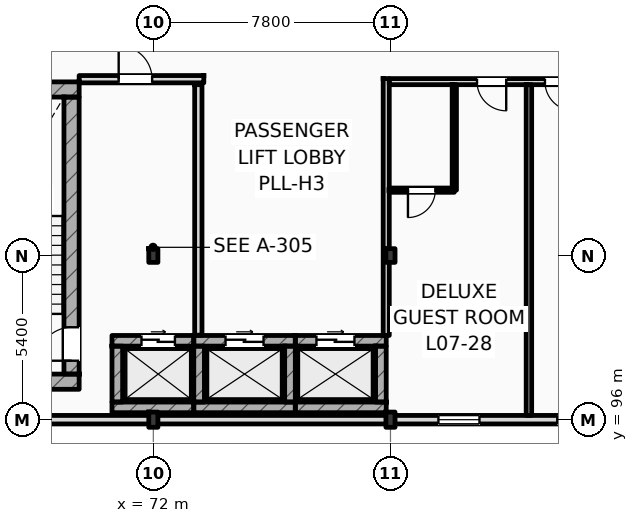
"""IFC4 building model, lengths in metres.
Left out: names, types, materials, properties, quantities, classifications, styles, units other than length and angle.
Written with IfcOpenShell. Run it as: python <this file> out.ifc"""

import sys

from ifc_helpers import new_model, si_unit, direction, frame, frame_2d, origin, origin_2d, place, context, subcontext, project, spatial, rectangle, i_section, extrude, element, fill, save


model = new_model("IFC4")
c1 = context("Model", 3, precision=1e-05, world=origin(), true_north=direction((0.0, 1.0)))
c2 = subcontext(c1, "Body", "Model", "MODEL_VIEW")
j1 = project(units=[si_unit("LENGTHUNIT", "METRE"), si_unit("PLANEANGLEUNIT", "RADIAN")], contexts=[c1])
p1 = place(None, origin())
s1 = spatial("IfcSite", under=j1, at=p1, CompositionType="ELEMENT")
p2 = place(p1, origin())
s2 = spatial("IfcBuilding", under=s1, at=p2, CompositionType="ELEMENT")
p3 = place(p2, frame((0.0, 0.0, 31.8)))
s3 = spatial("IfcBuildingStorey", under=s2, at=p3, CompositionType="ELEMENT", Elevation=31.8)
p4 = place(p3, frame((72.0, 96.0, 0.0), z_axis=(0.0, 0.0, 1.0), x_axis=(1.0, 0.0, 0.0)))
e1 = element("IfcColumn", 1, at=p4, inside=s3, PredefinedType="COLUMN", context=c2, shape_type="SweptSolid", body=[
    extrude(i_section(OverallWidth=0.3, OverallDepth=0.5, WebThickness=0.014, FlangeThickness=0.028, FilletRadius=0.027, at=origin_2d()), origin(), (0.0, 0.0, 1.0), 3.6),
])
p5 = place(p3, frame((72.0, 101.4, 0.0), z_axis=(0.0, 0.0, 1.0), x_axis=(1.0, 0.0, 0.0)))
e2 = element("IfcColumn", 2, at=p5, inside=s3, PredefinedType="COLUMN", context=c2, shape_type="SweptSolid", body=[
    extrude(i_section(OverallWidth=0.3, OverallDepth=0.45, WebThickness=0.014, FlangeThickness=0.026, FilletRadius=0.027, at=origin_2d()), origin(), (0.0, 0.0, 1.0), 3.6),
])
p6 = place(p3, frame((79.8, 96.0, 0.0), z_axis=(0.0, 0.0, 1.0), x_axis=(1.0, 0.0, 0.0)))
e3 = element("IfcColumn", 3, at=p6, inside=s3, PredefinedType="COLUMN", context=c2, shape_type="SweptSolid", body=[
    extrude(i_section(OverallWidth=0.3, OverallDepth=0.5, WebThickness=0.014, FlangeThickness=0.028, FilletRadius=0.027, at=origin_2d()), origin(), (0.0, 0.0, 1.0), 3.6),
])
p7 = place(p3, frame((79.8, 101.4, 0.0), z_axis=(0.0, 0.0, 1.0), x_axis=(1.0, 0.0, 0.0)))
e4 = element("IfcColumn", 4, at=p7, inside=s3, PredefinedType="COLUMN", context=c2, shape_type="SweptSolid", body=[
    extrude(i_section(OverallWidth=0.3, OverallDepth=0.45, WebThickness=0.014, FlangeThickness=0.026, FilletRadius=0.027, at=origin_2d()), origin(), (0.0, 0.0, 1.0), 3.6),
])
for number, where, z_axis, x_axis in (
    (5, (64.4, 106.862, 0.0), (0.0, 0.0, 1.0), (1.0, 0.0, 0.0)),
    (6, (64.4, 97.25, 0.0), (0.0, 0.0, 1.0), (1.0, 0.0, 0.0)),
):
    element("IfcWall", number, at=place(p3, frame(where, z_axis=z_axis, x_axis=x_axis)), inside=s3, PredefinedType="SHEAR", context=c2, shape_type="SweptSolid", body=[
        extrude(rectangle(XDim=5.16, YDim=0.5, at=frame_2d((2.58, 0.0))), origin(), (0.0, 0.0, 1.0), 3.6),
    ])
p8 = place(p3, frame((69.31, 97.5, 0.0), z_axis=(0.0, 0.0, 1.0), x_axis=(0.0, 1.0, 0.0)))
e7 = element("IfcWall", 7, at=p8, inside=s3, PredefinedType="SHEAR", context=c2, shape_type="SweptSolid", body=[
    extrude(rectangle(XDim=9.112, YDim=0.5, at=frame_2d((4.556, 0.0))), origin(), (0.0, 0.0, 1.0), 3.6),
])
p9 = place(p8, frame((0.44, 0.0, 0.0)))
e8 = element("IfcOpeningElement", 8, at=p9, cuts=e7, PredefinedType="OPENING", context=c2, shape_type="SweptSolid", body=[
    extrude(rectangle(XDim=1.1, YDim=2.2, at=frame_2d((0.55, 1.1))), frame((0.0, 0.26, 0.0), z_axis=(0.0, -1.0, 0.0), x_axis=(1.0, 0.0, 0.0)), (0.0, 0.0, 1.0), 0.52),
])
p10 = place(p3, frame((25.2, 96.0, 0.0), z_axis=(0.0, 0.0, 1.0), x_axis=(1.0, 0.0, 0.0)))
e9 = element("IfcWall", 9, at=p10, inside=s3, PredefinedType="STANDARD", context=c2, shape_type="SweptSolid", body=[
    extrude(rectangle(XDim=94.8, YDim=0.28, at=frame_2d((47.4, 0.0))), origin(), (0.0, 0.0, 1.0), 2.72),
])
p11 = place(p10, frame((16.394, 0.0, 0.9)))
e10 = element("IfcOpeningElement", 10, at=p11, cuts=e9, PredefinedType="OPENING", context=c2, shape_type="SweptSolid", body=[
    extrude(rectangle(XDim=2.0, YDim=1.64, at=frame_2d((1.0, 0.82))), frame((0.0, 0.15, 0.0), z_axis=(0.0, -1.0, 0.0), x_axis=(1.0, 0.0, 0.0)), (0.0, 0.0, 1.0), 0.3),
])
p12 = place(p10, frame((20.207, 0.0, 0.9)))
e11 = element("IfcOpeningElement", 11, at=p12, cuts=e9, PredefinedType="OPENING", context=c2, shape_type="SweptSolid", body=[
    extrude(rectangle(XDim=2.3, YDim=1.64, at=frame_2d((1.15, 0.82))), frame((0.0, 0.15, 0.0), z_axis=(0.0, -1.0, 0.0), x_axis=(1.0, 0.0, 0.0)), (0.0, 0.0, 1.0), 0.3),
])
p13 = place(p10, frame((24.287, 0.0, 0.9)))
e12 = element("IfcOpeningElement", 12, at=p13, cuts=e9, PredefinedType="OPENING", context=c2, shape_type="SweptSolid", body=[
    extrude(rectangle(XDim=2.358, YDim=1.64, at=frame_2d((1.179, 0.82))), frame((0.0, 0.15, 0.0), z_axis=(0.0, -1.0, 0.0), x_axis=(1.0, 0.0, 0.0)), (0.0, 0.0, 1.0), 0.3),
])
p14 = place(p10, frame((27.665, 0.0, 0.9)))
e13 = element("IfcOpeningElement", 13, at=p14, cuts=e9, PredefinedType="OPENING", context=c2, shape_type="SweptSolid", body=[
    extrude(rectangle(XDim=1.8, YDim=1.64, at=frame_2d((0.9, 0.82))), frame((0.0, 0.15, 0.0), z_axis=(0.0, -1.0, 0.0), x_axis=(1.0, 0.0, 0.0)), (0.0, 0.0, 1.0), 0.3),
])
p15 = place(p10, frame((32.103, 0.0, 0.9)))
e14 = element("IfcOpeningElement", 14, at=p15, cuts=e9, PredefinedType="OPENING", context=c2, shape_type="SweptSolid", body=[
    extrude(rectangle(XDim=2.359, YDim=1.64, at=frame_2d((1.179, 0.82))), frame((0.0, 0.15, 0.0), z_axis=(0.0, -1.0, 0.0), x_axis=(1.0, 0.0, 0.0)), (0.0, 0.0, 1.0), 0.3),
])
p16 = place(p10, frame((36.336, 0.0, 0.9)))
e15 = element("IfcOpeningElement", 15, at=p16, cuts=e9, PredefinedType="OPENING", context=c2, shape_type="SweptSolid", body=[
    extrude(rectangle(XDim=1.2, YDim=1.64, at=frame_2d((0.6, 0.82))), frame((0.0, 0.15, 0.0), z_axis=(0.0, -1.0, 0.0), x_axis=(1.0, 0.0, 0.0)), (0.0, 0.0, 1.0), 0.3),
])
p17 = place(p10, frame((56.177, 0.0, 0.9)))
e16 = element("IfcOpeningElement", 16, at=p17, cuts=e9, PredefinedType="OPENING", context=c2, shape_type="SweptSolid", body=[
    extrude(rectangle(XDim=1.35, YDim=1.64, at=frame_2d((0.675, 0.82))), frame((0.0, 0.15, 0.0), z_axis=(0.0, -1.0, 0.0), x_axis=(1.0, 0.0, 0.0)), (0.0, 0.0, 1.0), 0.3),
])
p18 = place(p10, frame((60.086, 0.0, 0.9)))
e17 = element("IfcOpeningElement", 17, at=p18, cuts=e9, PredefinedType="OPENING", context=c2, shape_type="SweptSolid", body=[
    extrude(rectangle(XDim=1.5, YDim=1.64, at=frame_2d((0.75, 0.82))), frame((0.0, 0.15, 0.0), z_axis=(0.0, -1.0, 0.0), x_axis=(1.0, 0.0, 0.0)), (0.0, 0.0, 1.0), 0.3),
])
p19 = place(p10, frame((64.838, 0.0, 0.9)))
e18 = element("IfcOpeningElement", 18, at=p19, cuts=e9, PredefinedType="OPENING", context=c2, shape_type="SweptSolid", body=[
    extrude(rectangle(XDim=1.65, YDim=1.64, at=frame_2d((0.825, 0.82))), frame((0.0, 0.15, 0.0), z_axis=(0.0, -1.0, 0.0), x_axis=(1.0, 0.0, 0.0)), (0.0, 0.0, 1.0), 0.3),
])
p20 = place(p10, frame((68.419, 0.0, 0.9)))
e19 = element("IfcOpeningElement", 19, at=p20, cuts=e9, PredefinedType="OPENING", context=c2, shape_type="SweptSolid", body=[
    extrude(rectangle(XDim=0.9, YDim=1.64, at=frame_2d((0.45, 0.82))), frame((0.0, 0.15, 0.0), z_axis=(0.0, -1.0, 0.0), x_axis=(1.0, 0.0, 0.0)), (0.0, 0.0, 1.0), 0.3),
])
p21 = place(p10, frame((73.544, 0.0, 0.9)))
e20 = element("IfcOpeningElement", 20, at=p21, cuts=e9, PredefinedType="OPENING", context=c2, shape_type="SweptSolid", body=[
    extrude(rectangle(XDim=1.95, YDim=1.64, at=frame_2d((0.975, 0.82))), frame((0.0, 0.15, 0.0), z_axis=(0.0, -1.0, 0.0), x_axis=(1.0, 0.0, 0.0)), (0.0, 0.0, 1.0), 0.3),
])
p22 = place(p10, frame((78.897, 0.0, 0.9)))
e21 = element("IfcOpeningElement", 21, at=p22, cuts=e9, PredefinedType="OPENING", context=c2, shape_type="SweptSolid", body=[
    extrude(rectangle(XDim=1.35, YDim=1.64, at=frame_2d((0.675, 0.82))), frame((0.0, 0.15, 0.0), z_axis=(0.0, -1.0, 0.0), x_axis=(1.0, 0.0, 0.0)), (0.0, 0.0, 1.0), 0.3),
])
p23 = place(p10, frame((82.249, 0.0, 0.9)))
e22 = element("IfcOpeningElement", 22, at=p23, cuts=e9, PredefinedType="OPENING", context=c2, shape_type="SweptSolid", body=[
    extrude(rectangle(XDim=2.25, YDim=1.64, at=frame_2d((1.125, 0.82))), frame((0.0, 0.15, 0.0), z_axis=(0.0, -1.0, 0.0), x_axis=(1.0, 0.0, 0.0)), (0.0, 0.0, 1.0), 0.3),
])
p24 = place(p10, frame((87.202, 0.0, 0.9)))
e23 = element("IfcOpeningElement", 23, at=p24, cuts=e9, PredefinedType="OPENING", context=c2, shape_type="SweptSolid", body=[
    extrude(rectangle(XDim=1.8, YDim=1.64, at=frame_2d((0.9, 0.82))), frame((0.0, 0.15, 0.0), z_axis=(0.0, -1.0, 0.0), x_axis=(1.0, 0.0, 0.0)), (0.0, 0.0, 1.0), 0.3),
])
p25 = place(p10, frame((90.867, 0.0, 0.9)))
e24 = element("IfcOpeningElement", 24, at=p25, cuts=e9, PredefinedType="OPENING", context=c2, shape_type="SweptSolid", body=[
    extrude(rectangle(XDim=2.55, YDim=1.64, at=frame_2d((1.275, 0.82))), frame((0.0, 0.15, 0.0), z_axis=(0.0, -1.0, 0.0), x_axis=(1.0, 0.0, 0.0)), (0.0, 0.0, 1.0), 0.3),
])
p26 = place(p3, frame((70.64, 98.595, 0.0), z_axis=(0.0, 0.0, 1.0), x_axis=(1.0, 0.0, 0.0)))
e25 = element("IfcWall", 25, at=p26, inside=s3, PredefinedType="SHEAR", context=c2, shape_type="SweptSolid", body=[
    extrude(rectangle(XDim=2.69, YDim=0.35, at=frame_2d((1.345, 0.0))), origin(), (0.0, 0.0, 1.0), 3.36),
])
p27 = place(p26, frame((0.97, 0.0, 0.0)))
e26 = element("IfcOpeningElement", 26, at=p27, cuts=e25, PredefinedType="OPENING", context=c2, shape_type="SweptSolid", body=[
    extrude(rectangle(XDim=1.1, YDim=2.2, at=frame_2d((0.55, 1.1))), frame((0.0, 0.185, 0.0), z_axis=(0.0, -1.0, 0.0), x_axis=(1.0, 0.0, 0.0)), (0.0, 0.0, 1.0), 0.37),
])
p28 = place(p3, frame((70.64, 96.405, 0.0), z_axis=(0.0, 0.0, 1.0), x_axis=(1.0, 0.0, 0.0)))
e27 = element("IfcWall", 27, at=p28, inside=s3, PredefinedType="SHEAR", context=c2, shape_type="SweptSolid", body=[
    extrude(rectangle(XDim=2.69, YDim=0.35, at=frame_2d((1.345, 0.0))), origin(), (0.0, 0.0, 1.0), 3.36),
])
p29 = place(p3, frame((70.815, 96.58, 0.0), z_axis=(0.0, 0.0, 1.0), x_axis=(0.0, 1.0, 0.0)))
e28 = element("IfcWall", 28, at=p29, inside=s3, PredefinedType="SHEAR", context=c2, shape_type="SweptSolid", body=[
    extrude(rectangle(XDim=1.84, YDim=0.35, at=frame_2d((0.92, 0.0))), origin(), (0.0, 0.0, 1.0), 3.36),
])
p30 = place(p3, frame((73.33, 98.595, 0.0), z_axis=(0.0, 0.0, 1.0), x_axis=(1.0, 0.0, 0.0)))
e29 = element("IfcWall", 29, at=p30, inside=s3, PredefinedType="SHEAR", context=c2, shape_type="SweptSolid", body=[
    extrude(rectangle(XDim=3.34, YDim=0.35, at=frame_2d((1.67, 0.0))), origin(), (0.0, 0.0, 1.0), 3.36),
])
p31 = place(p30, frame((1.045, 0.0, 0.0)))
e30 = element("IfcOpeningElement", 30, at=p31, cuts=e29, PredefinedType="OPENING", context=c2, shape_type="SweptSolid", body=[
    extrude(rectangle(XDim=1.25, YDim=2.25, at=frame_2d((0.625, 1.125))), frame((0.0, 0.185, 0.0), z_axis=(0.0, -1.0, 0.0), x_axis=(1.0, 0.0, 0.0)), (0.0, 0.0, 1.0), 0.37),
])
p32 = place(p3, frame((73.33, 96.405, 0.0), z_axis=(0.0, 0.0, 1.0), x_axis=(1.0, 0.0, 0.0)))
e31 = element("IfcWall", 31, at=p32, inside=s3, PredefinedType="SHEAR", context=c2, shape_type="SweptSolid", body=[
    extrude(rectangle(XDim=3.34, YDim=0.35, at=frame_2d((1.67, 0.0))), origin(), (0.0, 0.0, 1.0), 3.36),
])
for number, where, z_axis, x_axis in (
    (32, (73.505, 96.58, 0.0), (0.0, 0.0, 1.0), (0.0, 1.0, 0.0)),
    (33, (76.495, 96.58, 0.0), (0.0, 0.0, 1.0), (0.0, 1.0, 0.0)),
):
    element("IfcWall", number, at=place(p3, frame(where, z_axis=z_axis, x_axis=x_axis)), inside=s3, PredefinedType="SHEAR", context=c2, shape_type="SweptSolid", body=[
        extrude(rectangle(XDim=1.84, YDim=0.35, at=frame_2d((0.92, 0.0))), origin(), (0.0, 0.0, 1.0), 3.36),
    ])
p33 = place(p3, frame((76.67, 98.595, 0.0), z_axis=(0.0, 0.0, 1.0), x_axis=(1.0, 0.0, 0.0)))
e34 = element("IfcWall", 34, at=p33, inside=s3, PredefinedType="SHEAR", context=c2, shape_type="SweptSolid", body=[
    extrude(rectangle(XDim=2.99, YDim=0.35, at=frame_2d((1.495, 0.0))), origin(), (0.0, 0.0, 1.0), 3.36),
])
p34 = place(p33, frame((0.695, 0.0, 0.0)))
e35 = element("IfcOpeningElement", 35, at=p34, cuts=e34, PredefinedType="OPENING", context=c2, shape_type="SweptSolid", body=[
    extrude(rectangle(XDim=1.25, YDim=2.25, at=frame_2d((0.625, 1.125))), frame((0.0, 0.185, 0.0), z_axis=(0.0, -1.0, 0.0), x_axis=(1.0, 0.0, 0.0)), (0.0, 0.0, 1.0), 0.37),
])
p35 = place(p3, frame((76.67, 96.405, 0.0), z_axis=(0.0, 0.0, 1.0), x_axis=(1.0, 0.0, 0.0)))
e36 = element("IfcWall", 36, at=p35, inside=s3, PredefinedType="SHEAR", context=c2, shape_type="SweptSolid", body=[
    extrude(rectangle(XDim=2.99, YDim=0.35, at=frame_2d((1.495, 0.0))), origin(), (0.0, 0.0, 1.0), 3.36),
])
p36 = place(p3, frame((79.485, 96.58, 0.0), z_axis=(0.0, 0.0, 1.0), x_axis=(0.0, 1.0, 0.0)))
e37 = element("IfcWall", 37, at=p36, inside=s3, PredefinedType="SHEAR", context=c2, shape_type="SweptSolid", body=[
    extrude(rectangle(XDim=1.84, YDim=0.35, at=frame_2d((0.92, 0.0))), origin(), (0.0, 0.0, 1.0), 2.99),
])
p37 = place(p3, frame((73.48, 98.78, 0.0), z_axis=(0.0, 0.0, 1.0), x_axis=(0.0, 1.0, 0.0)))
e38 = element("IfcWall", 38, at=p37, inside=s3, PredefinedType="STANDARD", context=c2, shape_type="SweptSolid", body=[
    extrude(rectangle(XDim=8.24, YDim=0.24, at=frame_2d((4.12, 0.0))), origin(), (0.0, 0.0, 1.0), 3.36),
])
p38 = place(p3, frame((69.56, 107.2, 0.0), z_axis=(0.0, 0.0, 1.0), x_axis=(1.0, 0.0, 0.0)))
e39 = element("IfcWall", 39, at=p38, inside=s3, PredefinedType="STANDARD", context=c2, shape_type="SweptSolid", body=[
    extrude(rectangle(XDim=4.1, YDim=0.24, at=frame_2d((2.05, 0.0))), origin(), (0.0, 0.0, 1.0), 3.36),
])
p39 = place(p38, frame((1.3, 0.0, 0.0)))
e40 = element("IfcOpeningElement", 40, at=p39, cuts=e39, PredefinedType="OPENING", context=c2, shape_type="SweptSolid", body=[
    extrude(rectangle(XDim=1.1, YDim=2.2, at=frame_2d((0.55, 1.1))), frame((0.0, 0.13, 0.0), z_axis=(0.0, -1.0, 0.0), x_axis=(1.0, 0.0, 0.0)), (0.0, 0.0, 1.0), 0.26),
])
p40 = place(p3, frame((79.76, 107.12, 0.0), z_axis=(0.0, 0.0, 1.0), x_axis=(1.0, 0.0, 0.0)))
e41 = element("IfcWall", 41, at=p40, inside=s3, PredefinedType="PARTITIONING", context=c2, shape_type="SweptSolid", body=[
    extrude(rectangle(XDim=40.1, YDim=0.2, at=frame_2d((20.05, 0.0))), origin(), (0.0, 0.0, 1.0), 3.36),
])
p41 = place(p40, frame((2.887, 0.0, 0.0)))
e42 = element("IfcOpeningElement", 42, at=p41, cuts=e41, PredefinedType="OPENING", context=c2, shape_type="SweptSolid", body=[
    extrude(rectangle(XDim=0.96, YDim=2.2, at=frame_2d((0.48, 1.1))), frame((0.0, 0.11, 0.0), z_axis=(0.0, -1.0, 0.0), x_axis=(1.0, 0.0, 0.0)), (0.0, 0.0, 1.0), 0.22),
])
p42 = place(p40, frame((5.121, 0.0, 0.0)))
e43 = element("IfcOpeningElement", 43, at=p42, cuts=e41, PredefinedType="OPENING", context=c2, shape_type="SweptSolid", body=[
    extrude(rectangle(XDim=0.96, YDim=2.2, at=frame_2d((0.48, 1.1))), frame((0.0, 0.11, 0.0), z_axis=(0.0, -1.0, 0.0), x_axis=(1.0, 0.0, 0.0)), (0.0, 0.0, 1.0), 0.22),
])
p43 = place(p40, frame((11.698, 0.0, 0.0)))
e44 = element("IfcOpeningElement", 44, at=p43, cuts=e41, PredefinedType="OPENING", context=c2, shape_type="SweptSolid", body=[
    extrude(rectangle(XDim=0.96, YDim=2.2, at=frame_2d((0.48, 1.1))), frame((0.0, 0.11, 0.0), z_axis=(0.0, -1.0, 0.0), x_axis=(1.0, 0.0, 0.0)), (0.0, 0.0, 1.0), 0.22),
])
p44 = place(p40, frame((13.976, 0.0, 0.0)))
e45 = element("IfcOpeningElement", 45, at=p44, cuts=e41, PredefinedType="OPENING", context=c2, shape_type="SweptSolid", body=[
    extrude(rectangle(XDim=0.96, YDim=2.2, at=frame_2d((0.48, 1.1))), frame((0.0, 0.11, 0.0), z_axis=(0.0, -1.0, 0.0), x_axis=(1.0, 0.0, 0.0)), (0.0, 0.0, 1.0), 0.22),
])
p45 = place(p40, frame((20.554, 0.0, 0.0)))
e46 = element("IfcOpeningElement", 46, at=p45, cuts=e41, PredefinedType="OPENING", context=c2, shape_type="SweptSolid", body=[
    extrude(rectangle(XDim=0.96, YDim=2.2, at=frame_2d((0.48, 1.1))), frame((0.0, 0.11, 0.0), z_axis=(0.0, -1.0, 0.0), x_axis=(1.0, 0.0, 0.0)), (0.0, 0.0, 1.0), 0.22),
])
p46 = place(p40, frame((24.982, 0.0, 0.0)))
e47 = element("IfcOpeningElement", 47, at=p46, cuts=e41, PredefinedType="OPENING", context=c2, shape_type="SweptSolid", body=[
    extrude(rectangle(XDim=0.96, YDim=2.2, at=frame_2d((0.48, 1.1))), frame((0.0, 0.11, 0.0), z_axis=(0.0, -1.0, 0.0), x_axis=(1.0, 0.0, 0.0)), (0.0, 0.0, 1.0), 0.22),
])
p47 = place(p40, frame((29.409, 0.0, 0.0)))
e48 = element("IfcOpeningElement", 48, at=p47, cuts=e41, PredefinedType="OPENING", context=c2, shape_type="SweptSolid", body=[
    extrude(rectangle(XDim=0.96, YDim=2.2, at=frame_2d((0.48, 1.1))), frame((0.0, 0.11, 0.0), z_axis=(0.0, -1.0, 0.0), x_axis=(1.0, 0.0, 0.0)), (0.0, 0.0, 1.0), 0.22),
])
p48 = place(p40, frame((33.837, 0.0, 0.0)))
e49 = element("IfcOpeningElement", 49, at=p48, cuts=e41, PredefinedType="OPENING", context=c2, shape_type="SweptSolid", body=[
    extrude(rectangle(XDim=0.96, YDim=2.2, at=frame_2d((0.48, 1.1))), frame((0.0, 0.11, 0.0), z_axis=(0.0, -1.0, 0.0), x_axis=(1.0, 0.0, 0.0)), (0.0, 0.0, 1.0), 0.22),
])
p49 = place(p40, frame((36.027, 0.0, 0.0)))
e50 = element("IfcOpeningElement", 50, at=p49, cuts=e41, PredefinedType="OPENING", context=c2, shape_type="SweptSolid", body=[
    extrude(rectangle(XDim=0.96, YDim=2.2, at=frame_2d((0.48, 1.1))), frame((0.0, 0.11, 0.0), z_axis=(0.0, -1.0, 0.0), x_axis=(1.0, 0.0, 0.0)), (0.0, 0.0, 1.0), 0.22),
])
p50 = place(p3, frame((79.66, 98.77, 0.0), z_axis=(0.0, 0.0, 1.0), x_axis=(0.0, 1.0, 0.0)))
e51 = element("IfcWall", 51, at=p50, inside=s3, PredefinedType="PARTITIONING", context=c2, shape_type="SweptSolid", body=[
    extrude(rectangle(XDim=8.45, YDim=0.2, at=frame_2d((4.225, 0.0))), origin(), (0.0, 0.0, 1.0), 2.99),
])
p51 = place(p3, frame((84.354, 96.14, 0.0), z_axis=(0.0, 0.0, 1.0), x_axis=(0.0, 1.0, 0.0)))
e52 = element("IfcWall", 52, at=p51, inside=s3, PredefinedType="PARTITIONING", context=c2, shape_type="SweptSolid", body=[
    extrude(rectangle(XDim=10.88, YDim=0.18, at=frame_2d((5.44, 0.0))), origin(), (0.0, 0.0, 1.0), 3.36),
])
p52 = place(p3, frame((81.9, 103.55, 0.0), z_axis=(0.0, 0.0, 1.0), x_axis=(0.0, 1.0, 0.0)))
e53 = element("IfcWall", 53, at=p52, inside=s3, PredefinedType="PARTITIONING", context=c2, shape_type="SweptSolid", body=[
    extrude(rectangle(XDim=3.47, YDim=0.14, at=frame_2d((1.735, 0.0))), origin(), (0.0, 0.0, 1.0), 3.36),
])
p53 = place(p3, frame((79.75, 103.55, 0.0), z_axis=(0.0, 0.0, 1.0), x_axis=(1.0, 0.0, 0.0)))
e54 = element("IfcWall", 54, at=p53, inside=s3, PredefinedType="PARTITIONING", context=c2, shape_type="SweptSolid", body=[
    extrude(rectangle(XDim=2.15, YDim=0.14, at=frame_2d((1.075, 0.0))), origin(), (0.0, 0.0, 1.0), 3.36),
])
p54 = place(p53, frame((0.625, 0.0, 0.0)))
e55 = element("IfcOpeningElement", 55, at=p54, cuts=e54, PredefinedType="OPENING", context=c2, shape_type="SweptSolid", body=[
    extrude(rectangle(XDim=0.9, YDim=2.1, at=frame_2d((0.45, 1.05))), frame((0.0, 0.08, 0.0), z_axis=(0.0, -1.0, 0.0), x_axis=(1.0, 0.0, 0.0)), (0.0, 0.0, 1.0), 0.16),
])
p55 = place(p17, origin())
e56 = element("IfcWindow", 56, at=p55, inside=s3, PartitioningType="DOUBLE_PANEL_VERTICAL", PredefinedType="WINDOW", context=c2, shape_type="SweptSolid", body=[
    extrude(rectangle(XDim=1.35, YDim=1.64, at=frame_2d((0.675, 0.82))), frame((0.0, 0.03, 0.0), z_axis=(0.0, -1.0, 0.0), x_axis=(1.0, 0.0, 0.0)), (0.0, 0.0, 1.0), 0.06),
])
fill(e16, e56)
p56 = place(p18, origin())
e57 = element("IfcWindow", 57, at=p56, inside=s3, PartitioningType="DOUBLE_PANEL_VERTICAL", PredefinedType="WINDOW", context=c2, shape_type="SweptSolid", body=[
    extrude(rectangle(XDim=1.5, YDim=1.64, at=frame_2d((0.75, 0.82))), frame((0.0, 0.03, 0.0), z_axis=(0.0, -1.0, 0.0), x_axis=(1.0, 0.0, 0.0)), (0.0, 0.0, 1.0), 0.06),
])
fill(e17, e57)
p57 = place(p9, origin())
e58 = element("IfcDoor", 58, at=p57, inside=s3, OperationType="SINGLE_SWING_LEFT", PredefinedType="DOOR", context=c2, shape_type="SweptSolid", body=[
    extrude(rectangle(XDim=1.1, YDim=2.2, at=frame_2d((0.55, 1.1))), frame((0.0, 0.025, 0.0), z_axis=(0.0, -1.0, 0.0), x_axis=(1.0, 0.0, 0.0)), (0.0, 0.0, 1.0), 0.05),
])
fill(e8, e58)
p58 = place(p27, origin())
e59 = element("IfcDoor", 59, at=p58, inside=s3, OperationType="SLIDING_TO_LEFT", PredefinedType="DOOR", context=c2, shape_type="SweptSolid", body=[
    extrude(rectangle(XDim=1.1, YDim=2.2, at=frame_2d((0.55, 1.1))), frame((0.0, 0.025, 0.0), z_axis=(0.0, -1.0, 0.0), x_axis=(1.0, 0.0, 0.0)), (0.0, 0.0, 1.0), 0.05),
])
fill(e26, e59)
p59 = place(p31, origin())
e60 = element("IfcDoor", 60, at=p59, inside=s3, OperationType="SLIDING_TO_LEFT", PredefinedType="DOOR", context=c2, shape_type="SweptSolid", body=[
    extrude(rectangle(XDim=1.25, YDim=2.25, at=frame_2d((0.625, 1.125))), frame((0.0, 0.025, 0.0), z_axis=(0.0, -1.0, 0.0), x_axis=(1.0, 0.0, 0.0)), (0.0, 0.0, 1.0), 0.05),
])
fill(e30, e60)
p60 = place(p34, origin())
e61 = element("IfcDoor", 61, at=p60, inside=s3, OperationType="SLIDING_TO_LEFT", PredefinedType="DOOR", context=c2, shape_type="SweptSolid", body=[
    extrude(rectangle(XDim=1.25, YDim=2.25, at=frame_2d((0.625, 1.125))), frame((0.0, 0.025, 0.0), z_axis=(0.0, -1.0, 0.0), x_axis=(1.0, 0.0, 0.0)), (0.0, 0.0, 1.0), 0.05),
])
fill(e35, e61)
p61 = place(p39, origin())
e62 = element("IfcDoor", 62, at=p61, inside=s3, OperationType="SINGLE_SWING_LEFT", PredefinedType="DOOR", context=c2, shape_type="SweptSolid", body=[
    extrude(rectangle(XDim=1.1, YDim=2.2, at=frame_2d((0.55, 1.1))), frame((0.0, 0.025, 0.0), z_axis=(0.0, -1.0, 0.0), x_axis=(1.0, 0.0, 0.0)), (0.0, 0.0, 1.0), 0.05),
])
fill(e40, e62)
p62 = place(p41, frame((0.96, 0.0, 0.0), z_axis=(0.0, 0.0, 1.0), x_axis=(-1.0, 0.0, 0.0)))
e63 = element("IfcDoor", 63, at=p62, inside=s3, OperationType="SINGLE_SWING_RIGHT", PredefinedType="DOOR", context=c2, shape_type="SweptSolid", body=[
    extrude(rectangle(XDim=0.96, YDim=2.2, at=frame_2d((0.48, 1.1))), frame((0.0, 0.025, 0.0), z_axis=(0.0, -1.0, 0.0), x_axis=(1.0, 0.0, 0.0)), (0.0, 0.0, 1.0), 0.05),
])
fill(e42, e63)
p63 = place(p54, frame((0.9, 0.0, 0.0), z_axis=(0.0, 0.0, 1.0), x_axis=(-1.0, 0.0, 0.0)))
e64 = element("IfcDoor", 64, at=p63, inside=s3, OperationType="SINGLE_SWING_LEFT", PredefinedType="DOOR", context=c2, shape_type="SweptSolid", body=[
    extrude(rectangle(XDim=0.9, YDim=2.1, at=frame_2d((0.45, 1.05))), frame((0.0, 0.025, 0.0), z_axis=(0.0, -1.0, 0.0), x_axis=(1.0, 0.0, 0.0)), (0.0, 0.0, 1.0), 0.05),
])
fill(e55, e64)
p64 = place(p42, frame((0.96, 0.0, 0.0), z_axis=(0.0, 0.0, 1.0), x_axis=(-1.0, 0.0, 0.0)))
e65 = element("IfcDoor", 65, at=p64, inside=s3, OperationType="SINGLE_SWING_RIGHT", PredefinedType="DOOR", context=c2, shape_type="SweptSolid", body=[
    extrude(rectangle(XDim=0.96, YDim=2.2, at=frame_2d((0.48, 1.1))), frame((0.0, 0.025, 0.0), z_axis=(0.0, -1.0, 0.0), x_axis=(1.0, 0.0, 0.0)), (0.0, 0.0, 1.0), 0.05),
])
fill(e43, e65)
save(model, sys.argv[1])
